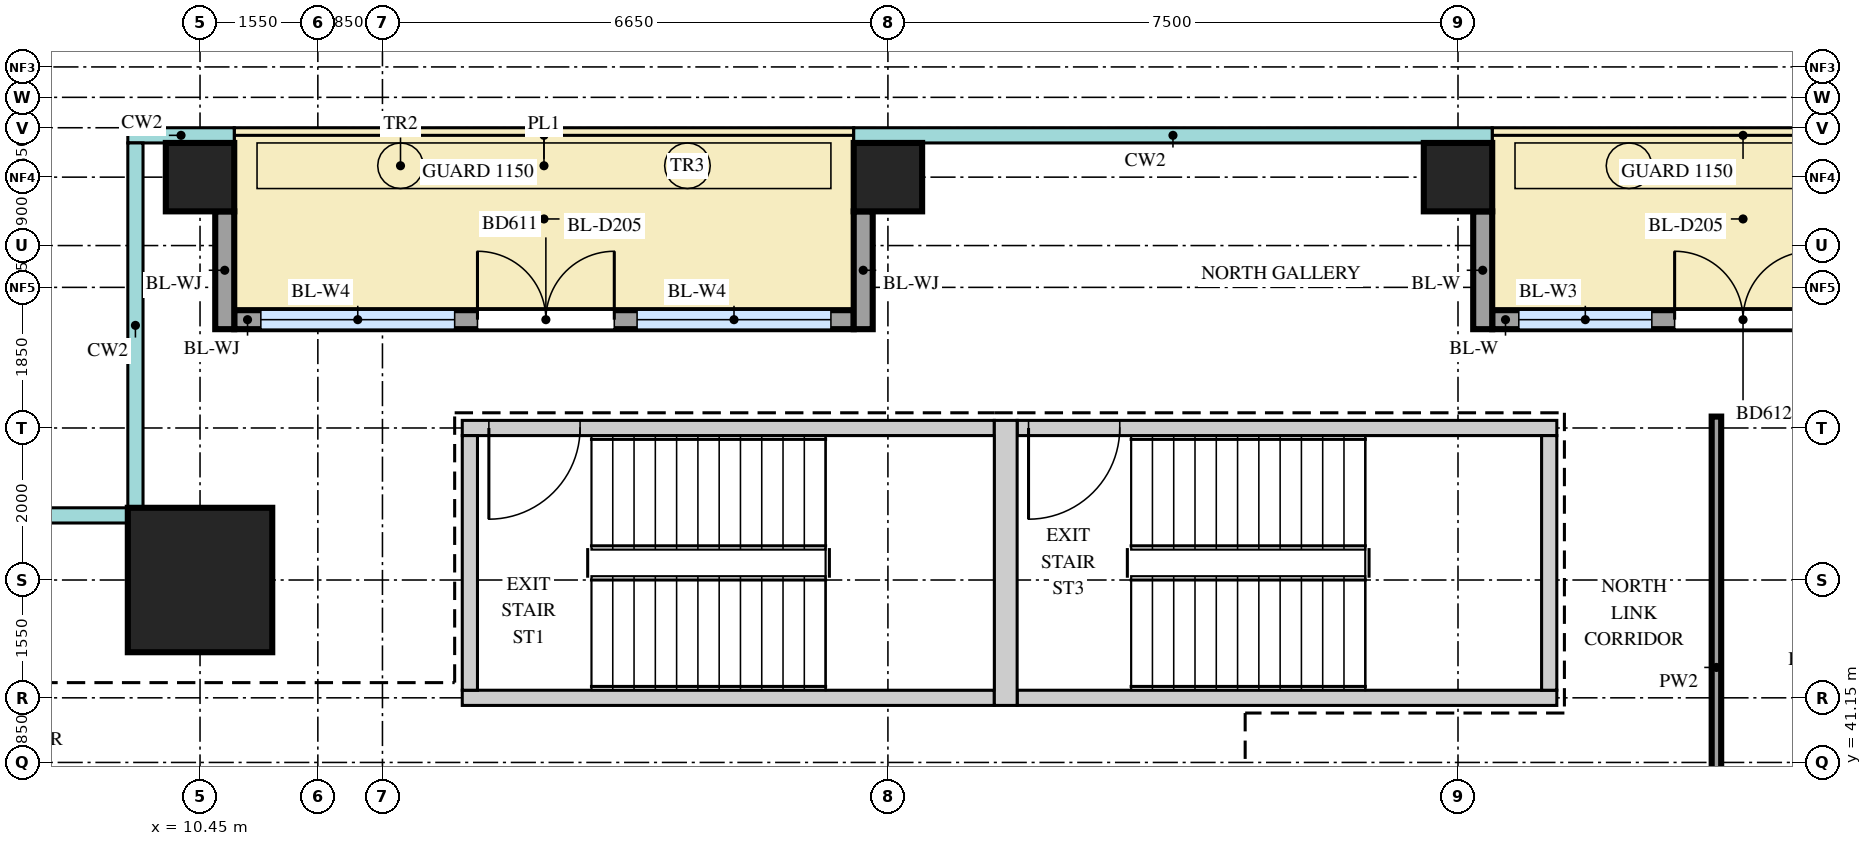
"""IFC4 building model, lengths in metres.
Left out: names, types, materials, properties, quantities, classifications, styles, units other than length and angle.
Written with IfcOpenShell. Run it as: python <this file> out.ifc"""

import sys

from ifc_helpers import new_model, si_unit, direction, frame, frame_2d, origin, origin_2d, place, context, subcontext, project, spatial, rectangle, extrude, source, transform, mapped, element, fill, save


model = new_model("IFC4")
c1 = context("Model", 3, precision=1e-05, world=origin(), true_north=direction((0.0, 1.0)))
c2 = subcontext(c1, "Body", "Model", "MODEL_VIEW")
j1 = project(units=[si_unit("LENGTHUNIT", "METRE"), si_unit("PLANEANGLEUNIT", "RADIAN")], contexts=[c1])
p1 = place(None, origin())
s1 = spatial("IfcSite", under=j1, at=p1, CompositionType="ELEMENT")
p2 = place(p1, origin())
s2 = spatial("IfcBuilding", under=s1, at=p2, CompositionType="ELEMENT")
p3 = place(p2, frame((0.0, 0.0, 270.2)))
s3 = spatial("IfcBuildingStorey", under=s2, at=p3, CompositionType="ELEMENT", Elevation=270.2)
m1 = source(origin(), c2, "Body", "SweptSolid", [
    extrude(rectangle(XDim=7.0, YDim=0.2, at=frame_2d((3.5, 0.0))), origin(), (0.0, 0.0, 1.0), 3.75),
])
p4 = place(p3, frame((13.9, 45.55, 0.0), z_axis=(0.0, 0.0, 1.0), x_axis=(1.0, 0.0, 0.0)))
e1 = element("IfcWall", 1, at=p4, inside=s3, PredefinedType="SHEAR", context=c2, shape_type="MappedRepresentation", body=[
    mapped(m1, transform((0.0, 0.0, 0.0))),
])
m2 = source(origin(), c2, "Body", "SweptSolid", [
    extrude(rectangle(XDim=1.2, YDim=2.1, at=frame_2d((0.6, 1.05))), frame((0.0, 0.11, 0.0), z_axis=(0.0, -1.0, 0.0), x_axis=(1.0, 0.0, 0.0)), (0.0, 0.0, 1.0), 0.22),
])
p5 = place(p4, frame((0.35, 0.0, 0.0)))
e2 = element("IfcOpeningElement", 2, at=p5, cuts=e1, PredefinedType="OPENING", context=c2, shape_type="MappedRepresentation", body=[
    mapped(m2, transform((0.0, 0.0, 0.0))),
])
p6 = place(p3, frame((13.9, 42.0, 0.0), z_axis=(0.0, 0.0, 1.0), x_axis=(1.0, 0.0, 0.0)))
e3 = element("IfcWall", 3, at=p6, inside=s3, PredefinedType="SHEAR", context=c2, shape_type="MappedRepresentation", body=[
    mapped(m1, transform((0.0, 0.0, 0.0))),
])
m3 = source(origin(), c2, "Body", "SweptSolid", [
    extrude(rectangle(XDim=7.1, YDim=0.2, at=frame_2d((3.55, 0.0))), origin(), (0.0, 0.0, 1.0), 3.75),
])
p7 = place(p3, frame((21.2, 45.55, 0.0), z_axis=(0.0, 0.0, 1.0), x_axis=(1.0, 0.0, 0.0)))
e4 = element("IfcWall", 4, at=p7, inside=s3, PredefinedType="SHEAR", context=c2, shape_type="MappedRepresentation", body=[
    mapped(m3, transform((0.0, 0.0, 0.0))),
])
p8 = place(p7, frame((0.15, 0.0, 0.0)))
e5 = element("IfcOpeningElement", 5, at=p8, cuts=e4, PredefinedType="OPENING", context=c2, shape_type="MappedRepresentation", body=[
    mapped(m2, transform((0.0, 0.0, 0.0))),
])
p9 = place(p3, frame((21.2, 42.0, 0.0), z_axis=(0.0, 0.0, 1.0), x_axis=(1.0, 0.0, 0.0)))
e6 = element("IfcWall", 6, at=p9, inside=s3, PredefinedType="SHEAR", context=c2, shape_type="MappedRepresentation", body=[
    mapped(m3, transform((0.0, 0.0, 0.0))),
])
m4 = source(origin(), c2, "Body", "SweptSolid", [
    extrude(rectangle(XDim=3.75, YDim=0.3, at=frame_2d((1.875, 0.0))), origin(), (0.0, 0.0, 1.0), 3.75),
])
p10 = place(p3, frame((21.05, 41.9, 0.0), z_axis=(0.0, 0.0, 1.0), x_axis=(0.0, 1.0, 0.0)))
e7 = element("IfcWall", 7, at=p10, inside=s3, PredefinedType="SHEAR", context=c2, shape_type="MappedRepresentation", body=[
    mapped(m4, transform((0.0, 0.0, 0.0))),
])
m5 = source(origin(), c2, "Body", "SweptSolid", [
    extrude(rectangle(XDim=3.35, YDim=0.2, at=frame_2d((1.675, 0.0))), origin(), (0.0, 0.0, 1.0), 3.75),
])
for number, where, z_axis, x_axis in (
    (8, (14.0, 42.1, 0.0), (0.0, 0.0, 1.0), (0.0, 1.0, 0.0)),
    (9, (28.2, 42.1, 0.0), (0.0, 0.0, 1.0), (0.0, 1.0, 0.0)),
):
    element("IfcWall", number, at=place(p3, frame(where, z_axis=z_axis, x_axis=x_axis)), inside=s3, PredefinedType="SHEAR", context=c2, shape_type="MappedRepresentation", body=[
        mapped(m5, transform((0.0, 0.0, 0.0))),
    ])
m6 = source(origin(), c2, "Body", "SweptSolid", [
    extrude(rectangle(XDim=1.9, YDim=1.9, at=origin_2d()), origin(), (0.0, 0.0, 1.0), 4.0),
])
p11 = place(p3, frame((10.45, 43.55, 0.0), z_axis=(0.0, 0.0, 1.0), x_axis=(1.0, 0.0, 0.0)))
e10 = element("IfcColumn", 10, at=p11, inside=s3, PredefinedType="COLUMN", context=c2, shape_type="MappedRepresentation", body=[
    mapped(m6, transform((0.0, 0.0, 0.0))),
])
m7 = source(origin(), c2, "Body", "SweptSolid", [
    extrude(rectangle(XDim=0.9, YDim=0.9, at=origin_2d()), origin(), (0.0, 0.0, 1.0), 4.0),
])
for number, where, z_axis, x_axis in (
    (11, (10.45, 48.85, 0.0), (0.0, 0.0, 1.0), (1.0, 0.0, 0.0)),
    (12, (19.5, 48.85, 0.0), (0.0, 0.0, 1.0), (1.0, 0.0, 0.0)),
    (13, (27.0, 48.85, 0.0), (0.0, 0.0, 1.0), (1.0, 0.0, 0.0)),
):
    element("IfcColumn", number, at=place(p3, frame(where, z_axis=z_axis, x_axis=x_axis)), inside=s3, PredefinedType="COLUMN", context=c2, shape_type="MappedRepresentation", body=[
        mapped(m7, transform((0.0, 0.0, 0.0))),
    ])
m8 = source(origin(), c2, "Body", "SweptSolid", [
    extrude(rectangle(XDim=8.15, YDim=0.25, at=frame_2d((4.075, 0.0))), origin(), (0.0, 0.0, 1.0), 3.2),
])
p12 = place(p3, frame((10.9, 46.975, 0.0), z_axis=(0.0, 0.0, 1.0), x_axis=(1.0, 0.0, 0.0)))
e14 = element("IfcWall", 14, at=p12, inside=s3, PredefinedType="SOLIDWALL", context=c2, shape_type="MappedRepresentation", body=[
    mapped(m8, transform((0.0, 0.0, 0.0))),
])
m9 = source(origin(), c2, "Body", "SweptSolid", [
    extrude(rectangle(XDim=2.55, YDim=2.4, at=frame_2d((1.275, 1.2))), frame((0.0, 0.135, 0.0), z_axis=(0.0, -1.0, 0.0), x_axis=(1.0, 0.0, 0.0)), (0.0, 0.0, 1.0), 0.27),
])
p13 = place(p12, frame((0.35, 0.0, 0.0)))
e15 = element("IfcOpeningElement", 15, at=p13, cuts=e14, PredefinedType="OPENING", context=c2, shape_type="MappedRepresentation", body=[
    mapped(m9, transform((0.0, 0.0, 0.0))),
])
p14 = place(p12, frame((5.3, 0.0, 0.0)))
e16 = element("IfcOpeningElement", 16, at=p14, cuts=e14, PredefinedType="OPENING", context=c2, shape_type="MappedRepresentation", body=[
    mapped(m9, transform((0.0, 0.0, 0.0))),
])
m10 = source(origin(), c2, "Body", "SweptSolid", [
    extrude(rectangle(XDim=1.8, YDim=2.4, at=frame_2d((0.9, 1.2))), frame((0.0, 0.135, 0.0), z_axis=(0.0, -1.0, 0.0), x_axis=(1.0, 0.0, 0.0)), (0.0, 0.0, 1.0), 0.27),
])
p15 = place(p12, frame((3.2, 0.0, 0.0)))
e17 = element("IfcOpeningElement", 17, at=p15, cuts=e14, PredefinedType="OPENING", context=c2, shape_type="MappedRepresentation", body=[
    mapped(m10, transform((0.0, 0.0, 0.0))),
])
m11 = source(origin(), c2, "Body", "SweptSolid", [
    extrude(rectangle(XDim=1.55, YDim=0.25, at=frame_2d((0.775, 0.0))), origin(), (0.0, 0.0, 1.0), 3.2),
])
for number, where, z_axis, x_axis in (
    (18, (10.775, 48.4, 0.0), (0.0, 0.0, 1.0), (0.0, -1.0, 0.0)),
    (19, (19.175, 48.4, 0.0), (0.0, 0.0, 1.0), (0.0, -1.0, 0.0)),
):
    element("IfcWall", number, at=place(p3, frame(where, z_axis=z_axis, x_axis=x_axis)), inside=s3, PredefinedType="SOLIDWALL", context=c2, shape_type="MappedRepresentation", body=[
        mapped(m11, transform((0.0, 0.0, 0.0))),
    ])
m12 = source(origin(), c2, "Body", "SweptSolid", [
    extrude(rectangle(XDim=6.6, YDim=0.25, at=frame_2d((3.3, 0.0))), origin(), (0.0, 0.0, 1.0), 3.75),
])
p16 = place(p3, frame((27.45, 46.975, 0.0), z_axis=(0.0, 0.0, 1.0), x_axis=(1.0, 0.0, 0.0)))
e20 = element("IfcWall", 20, at=p16, inside=s3, PredefinedType="SOLIDWALL", context=c2, shape_type="MappedRepresentation", body=[
    mapped(m12, transform((0.0, 0.0, 0.0))),
])
m13 = source(origin(), c2, "Body", "SweptSolid", [
    extrude(rectangle(XDim=1.75, YDim=2.4, at=frame_2d((0.875, 1.2))), frame((0.0, 0.135, 0.0), z_axis=(0.0, -1.0, 0.0), x_axis=(1.0, 0.0, 0.0)), (0.0, 0.0, 1.0), 0.27),
])
p17 = place(p16, frame((0.35, 0.0, 0.0)))
e21 = element("IfcOpeningElement", 21, at=p17, cuts=e20, PredefinedType="OPENING", context=c2, shape_type="MappedRepresentation", body=[
    mapped(m13, transform((0.0, 0.0, 0.0))),
])
p18 = place(p16, frame((4.5, 0.0, 0.0)))
e22 = element("IfcOpeningElement", 22, at=p18, cuts=e20, PredefinedType="OPENING", context=c2, shape_type="MappedRepresentation", body=[
    mapped(m13, transform((0.0, 0.0, 0.0))),
])
p19 = place(p16, frame((2.4, 0.0, 0.0)))
e23 = element("IfcOpeningElement", 23, at=p19, cuts=e20, PredefinedType="OPENING", context=c2, shape_type="MappedRepresentation", body=[
    mapped(m10, transform((0.0, 0.0, 0.0))),
])
m14 = source(origin(), c2, "Body", "SweptSolid", [
    extrude(rectangle(XDim=1.55, YDim=0.25, at=frame_2d((0.775, 0.0))), origin(), (0.0, 0.0, 1.0), 3.75),
])
p20 = place(p3, frame((27.325, 48.4, 0.0), z_axis=(0.0, 0.0, 1.0), x_axis=(0.0, -1.0, 0.0)))
e24 = element("IfcWall", 24, at=p20, inside=s3, PredefinedType="SOLIDWALL", context=c2, shape_type="MappedRepresentation", body=[
    mapped(m14, transform((0.0, 0.0, 0.0))),
])
m15 = source(origin(), c2, "Body", "SweptSolid", [
    extrude(rectangle(XDim=6.6, YDim=0.125, at=frame_2d((3.3, 0.0))), origin(), (0.0, 0.0, 1.0), 3.8),
])
p21 = place(p3, frame((30.4, 39.1, 0.0), z_axis=(0.0, 0.0, 1.0), x_axis=(0.0, 1.0, 0.0)))
e25 = element("IfcWall", 25, at=p21, inside=s3, PredefinedType="PARTITIONING", context=c2, shape_type="MappedRepresentation", body=[
    mapped(m15, transform((0.0, 0.0, 0.0))),
])
m16 = source(origin(), c2, "Body", "SweptSolid", [
    extrude(rectangle(XDim=2.55, YDim=2.4, at=frame_2d((1.275, 1.2))), frame((0.0, 0.03, 0.0), z_axis=(0.0, -1.0, 0.0), x_axis=(1.0, 0.0, 0.0)), (0.0, 0.0, 1.0), 0.06),
])
p22 = place(p13, origin())
e26 = element("IfcWindow", 26, at=p22, inside=s3, PartitioningType="SINGLE_PANEL", PredefinedType="WINDOW", context=c2, shape_type="MappedRepresentation", body=[
    mapped(m16, transform((0.0, 0.0, 0.0))),
])
fill(e15, e26)
p23 = place(p14, origin())
e27 = element("IfcWindow", 27, at=p23, inside=s3, PartitioningType="SINGLE_PANEL", PredefinedType="WINDOW", context=c2, shape_type="MappedRepresentation", body=[
    mapped(m16, transform((0.0, 0.0, 0.0))),
])
fill(e16, e27)
m17 = source(origin(), c2, "Body", "SweptSolid", [
    extrude(rectangle(XDim=1.8, YDim=2.4, at=frame_2d((0.9, 1.2))), frame((0.0, 0.025, 0.0), z_axis=(0.0, -1.0, 0.0), x_axis=(1.0, 0.0, 0.0)), (0.0, 0.0, 1.0), 0.05),
])
p24 = place(p15, origin())
e28 = element("IfcDoor", 28, at=p24, inside=s3, OperationType="DOUBLE_DOOR_DOUBLE_SWING", PredefinedType="DOOR", context=c2, shape_type="MappedRepresentation", body=[
    mapped(m17, transform((0.0, 0.0, 0.0))),
])
fill(e17, e28)
m18 = source(origin(), c2, "Body", "SweptSolid", [
    extrude(rectangle(XDim=1.75, YDim=2.4, at=frame_2d((0.875, 1.2))), frame((0.0, 0.03, 0.0), z_axis=(0.0, -1.0, 0.0), x_axis=(1.0, 0.0, 0.0)), (0.0, 0.0, 1.0), 0.06),
])
p25 = place(p17, origin())
e29 = element("IfcWindow", 29, at=p25, inside=s3, PartitioningType="SINGLE_PANEL", PredefinedType="WINDOW", context=c2, shape_type="MappedRepresentation", body=[
    mapped(m18, transform((0.0, 0.0, 0.0))),
])
fill(e21, e29)
p26 = place(p19, origin())
e30 = element("IfcDoor", 30, at=p26, inside=s3, OperationType="DOUBLE_DOOR_DOUBLE_SWING", PredefinedType="DOOR", context=c2, shape_type="MappedRepresentation", body=[
    mapped(m17, transform((0.0, 0.0, 0.0))),
])
fill(e23, e30)
m19 = source(origin(), c2, "Body", "SweptSolid", [
    extrude(rectangle(XDim=1.2, YDim=2.1, at=frame_2d((0.6, 1.05))), frame((0.0, 0.025, 0.0), z_axis=(0.0, -1.0, 0.0), x_axis=(1.0, 0.0, 0.0)), (0.0, 0.0, 1.0), 0.05),
])
p27 = place(p5, origin())
e31 = element("IfcDoor", 31, at=p27, inside=s3, OperationType="SINGLE_SWING_LEFT", PredefinedType="DOOR", context=c2, shape_type="MappedRepresentation", body=[
    mapped(m19, transform((0.0, 0.0, 0.0))),
])
fill(e2, e31)
p28 = place(p8, origin())
e32 = element("IfcDoor", 32, at=p28, inside=s3, OperationType="SINGLE_SWING_LEFT", PredefinedType="DOOR", context=c2, shape_type="MappedRepresentation", body=[
    mapped(m19, transform((0.0, 0.0, 0.0))),
])
fill(e5, e32)
save(model, sys.argv[1])
